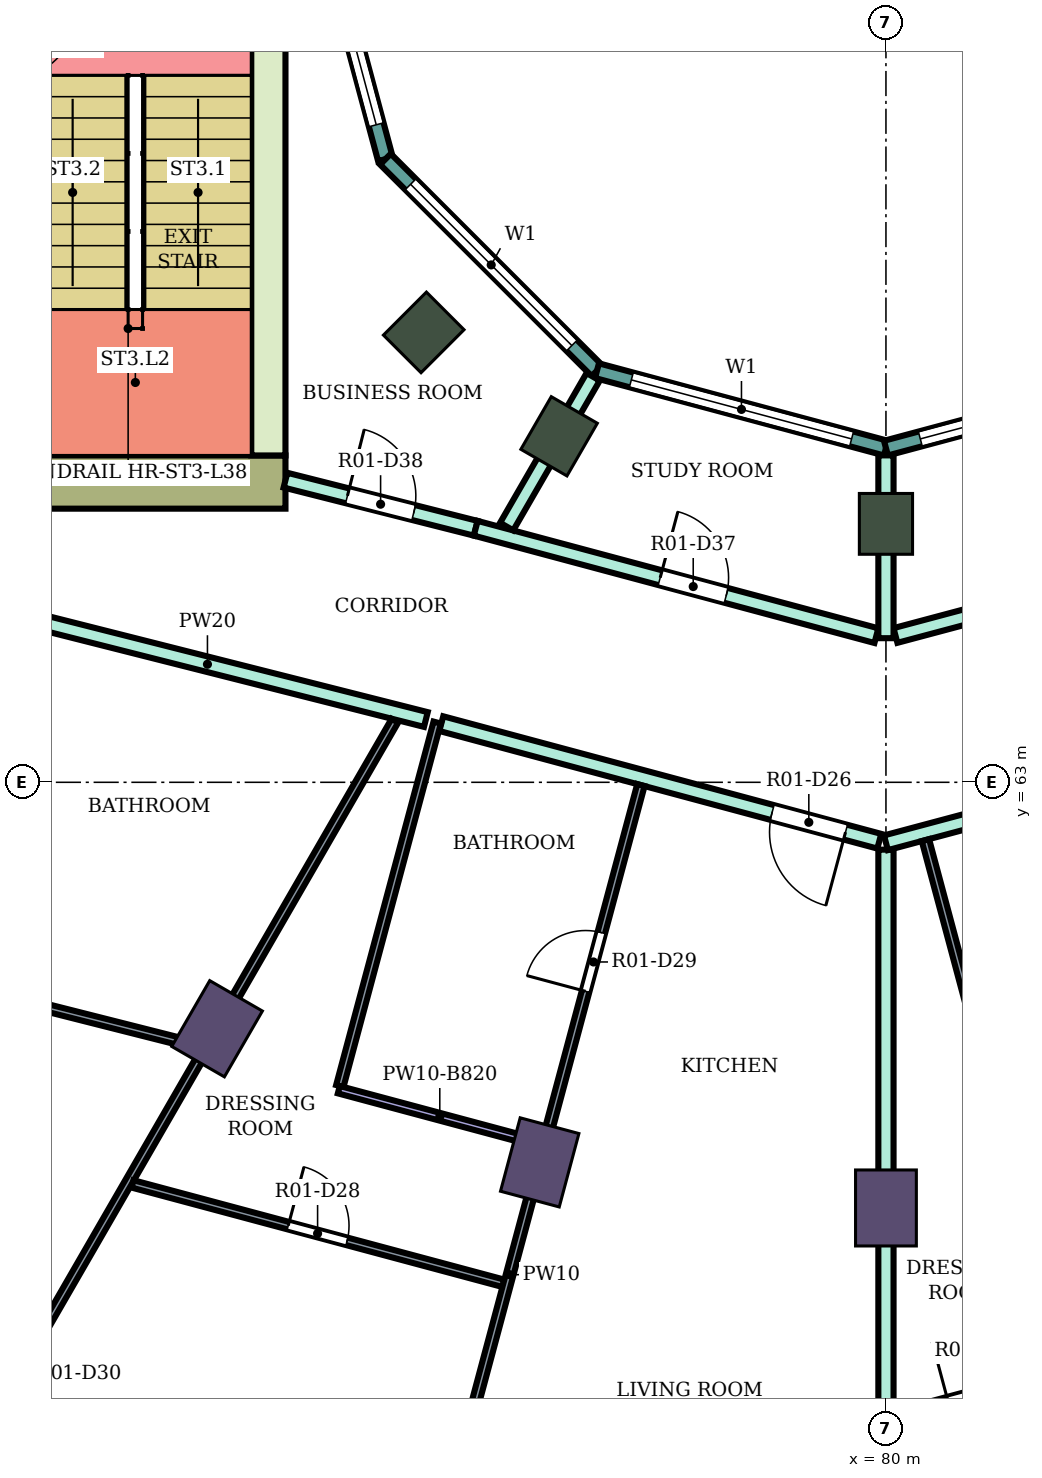
"""IFC4 building model, lengths in metres.
Left out: names, types, materials, properties, quantities, classifications, styles, units other than length and angle.
Written with IfcOpenShell. Run it as: python <this file> out.ifc"""

import sys

from ifc_helpers import new_model, si_unit, direction, frame, frame_2d, origin, origin_2d, place, context, subcontext, project, spatial, rectangle, extrude, element, fill, save


model = new_model("IFC4")
c1 = context("Model", 3, precision=1e-05, world=origin(), true_north=direction((0.0, 1.0)))
c2 = subcontext(c1, "Body", "Model", "MODEL_VIEW")
j1 = project(units=[si_unit("LENGTHUNIT", "METRE"), si_unit("PLANEANGLEUNIT", "RADIAN")], contexts=[c1])
p1 = place(None, origin())
s1 = spatial("IfcSite", under=j1, at=p1, CompositionType="ELEMENT")
p2 = place(p1, origin())
s2 = spatial("IfcBuilding", under=s1, at=p2, CompositionType="ELEMENT")
p3 = place(p2, frame((0.0, 0.0, 165.9)))
s3 = spatial("IfcBuildingStorey", under=s2, at=p3, CompositionType="ELEMENT", Elevation=165.9)
for number, where, z_axis, x_axis in (
    (1, (71.2, 59.758, 0.0), (0.0, 0.0, 1.0), (-0.5, -0.866, 0.0)),
    (2, (75.445, 58.0, 0.0), (0.0, 0.0, 1.0), (-0.259, -0.966, 0.0)),
    (3, (80.0, 57.4, 0.0), (0.0, 0.0, 1.0), (0.0, -1.0, 0.0)),
):
    element("IfcColumn", number, at=place(p3, frame(where, z_axis=z_axis, x_axis=x_axis)), inside=s3, PredefinedType="COLUMN", context=c2, shape_type="SweptSolid", body=[
        extrude(rectangle(XDim=1.0, YDim=0.8, at=origin_2d()), origin(), (0.0, 0.0, 1.0), 4.1),
    ])
for number, where, z_axis, x_axis in (
    (4, (73.919, 68.919, 0.0), (0.0, 0.0, 1.0), (-0.707, -0.707, 0.0)),
    (5, (75.7, 67.552, 0.0), (0.0, 0.0, 1.0), (-0.5, -0.866, 0.0)),
    (6, (80.0, 66.4, 0.0), (0.0, 0.0, 1.0), (0.0, -1.0, 0.0)),
):
    element("IfcColumn", number, at=place(p3, frame(where, z_axis=z_axis, x_axis=x_axis)), inside=s3, PredefinedType="COLUMN", context=c2, shape_type="SweptSolid", body=[
        extrude(rectangle(XDim=0.8, YDim=0.7, at=origin_2d()), origin(), (0.0, 0.0, 1.0), 4.1),
    ])
p4 = place(p3, frame((72.1, 66.95, 0.0), z_axis=(0.0, 0.0, 1.0), x_axis=(-1.0, 0.0, 0.0)))
e7 = element("IfcWall", 7, at=p4, inside=s3, PredefinedType="SHEAR", context=c2, shape_type="SweptSolid", body=[
    extrude(rectangle(XDim=14.8, YDim=0.7, at=frame_2d((7.4, 0.0))), origin(), (0.0, 0.0, 1.0), 3.78),
])
p5 = place(p4, frame((4.2, 0.0, 0.0)))
e8 = element("IfcOpeningElement", 8, at=p5, cuts=e7, PredefinedType="OPENING", context=c2, shape_type="SweptSolid", body=[
    extrude(rectangle(XDim=2.4, YDim=2.4, at=frame_2d((1.2, 1.2))), frame((0.0, 0.36, 0.0), z_axis=(0.0, -1.0, 0.0), x_axis=(1.0, 0.0, 0.0)), (0.0, 0.0, 1.0), 0.72),
])
p6 = place(p3, frame((71.875, 75.0, 0.0), z_axis=(0.0, 0.0, 1.0), x_axis=(0.0, -1.0, 0.0)))
e9 = element("IfcWall", 9, at=p6, inside=s3, PredefinedType="SHEAR", context=c2, shape_type="SweptSolid", body=[
    extrude(rectangle(XDim=7.7, YDim=0.45, at=frame_2d((3.85, 0.0))), origin(), (0.0, 0.0, 1.0), 3.78),
])
p7 = place(p3, frame((72.396, 75.0, 0.0), z_axis=(0.0, 0.0, 1.0), x_axis=(0.258789828301, -0.965933654434, 0.0)))
e10 = element("IfcWall", 10, at=p7, inside=s3, PredefinedType="NOTDEFINED", context=c2, shape_type="SweptSolid", body=[
    extrude(rectangle(XDim=3.936, YDim=0.2, at=frame_2d((1.968, 0.0))), origin(), (0.0, 0.0, 1.0), 4.1),
])
p8 = place(p7, frame((0.468, 0.0, 0.9)))
e11 = element("IfcOpeningElement", 11, at=p8, cuts=e10, PredefinedType="OPENING", context=c2, shape_type="SweptSolid", body=[
    extrude(rectangle(XDim=3.0, YDim=2.3, at=frame_2d((1.5, 1.15))), frame((0.0, 0.11, 0.0), z_axis=(0.0, -1.0, 0.0), x_axis=(1.0, 0.0, 0.0)), (0.0, 0.0, 1.0), 0.22),
])
p9 = place(p3, frame((73.415, 71.198, 0.0), z_axis=(0.0, 0.0, 1.0), x_axis=(0.707106781187, -0.707106781187, 0.0)))
e12 = element("IfcWall", 12, at=p9, inside=s3, PredefinedType="NOTDEFINED", context=c2, shape_type="SweptSolid", body=[
    extrude(rectangle(XDim=3.936, YDim=0.2, at=frame_2d((1.968, 0.0))), origin(), (0.0, 0.0, 1.0), 4.1),
])
p10 = place(p9, frame((0.468, 0.0, 0.9)))
e13 = element("IfcOpeningElement", 13, at=p10, cuts=e12, PredefinedType="OPENING", context=c2, shape_type="SweptSolid", body=[
    extrude(rectangle(XDim=3.0, YDim=2.3, at=frame_2d((1.5, 1.15))), frame((0.0, 0.11, 0.0), z_axis=(0.0, -1.0, 0.0), x_axis=(1.0, 0.0, 0.0)), (0.0, 0.0, 1.0), 0.22),
])
p11 = place(p3, frame((76.198, 68.415, 0.0), z_axis=(0.0, 0.0, 1.0), x_axis=(0.965933654434, -0.258789828301, 0.0)))
e14 = element("IfcWall", 14, at=p11, inside=s3, PredefinedType="NOTDEFINED", context=c2, shape_type="SweptSolid", body=[
    extrude(rectangle(XDim=3.936, YDim=0.2, at=frame_2d((1.968, 0.0))), origin(), (0.0, 0.0, 1.0), 4.1),
])
p12 = place(p11, frame((0.468, 0.0, 0.9)))
e15 = element("IfcOpeningElement", 15, at=p12, cuts=e14, PredefinedType="OPENING", context=c2, shape_type="SweptSolid", body=[
    extrude(rectangle(XDim=3.0, YDim=2.3, at=frame_2d((1.5, 1.15))), frame((0.0, 0.11, 0.0), z_axis=(0.0, -1.0, 0.0), x_axis=(1.0, 0.0, 0.0)), (0.0, 0.0, 1.0), 0.22),
])
p13 = place(p3, frame((80.0, 67.396, 0.0), z_axis=(0.0, 0.0, 1.0), x_axis=(0.965933654434, 0.258789828301, 0.0)))
e16 = element("IfcWall", 16, at=p13, inside=s3, PredefinedType="NOTDEFINED", context=c2, shape_type="SweptSolid", body=[
    extrude(rectangle(XDim=3.936, YDim=0.2, at=frame_2d((1.968, 0.0))), origin(), (0.0, 0.0, 1.0), 4.1),
])
p14 = place(p13, frame((0.468, 0.0, 0.9)))
e17 = element("IfcOpeningElement", 17, at=p14, cuts=e16, PredefinedType="OPENING", context=c2, shape_type="SweptSolid", body=[
    extrude(rectangle(XDim=3.0, YDim=2.3, at=frame_2d((1.5, 1.15))), frame((0.0, 0.11, 0.0), z_axis=(0.0, -1.0, 0.0), x_axis=(1.0, 0.0, 0.0)), (0.0, 0.0, 1.0), 0.22),
])
p15 = place(p3, frame((68.2, 65.28, 0.0), z_axis=(0.0, 0.0, 1.0), x_axis=(0.969450596516, -0.245286650503, 0.0)))
e18 = element("IfcWall", 18, at=p15, inside=s3, PredefinedType="PARTITIONING", context=c2, shape_type="SweptSolid", body=[
    extrude(rectangle(XDim=5.928, YDim=0.2, at=frame_2d((2.964, 0.0))), origin(), (0.0, 0.0, 1.0), 3.65),
])
p16 = place(p3, frame((72.1, 66.975, 0.0), z_axis=(0.0, 0.0, 1.0), x_axis=(0.969471314457, -0.245204752086, 0.0)))
e19 = element("IfcWall", 19, at=p16, inside=s3, PredefinedType="PARTITIONING", context=c2, shape_type="SweptSolid", body=[
    extrude(rectangle(XDim=2.582, YDim=0.2, at=frame_2d((1.291, 0.0))), origin(), (0.0, 0.0, 1.0), 3.65),
])
p17 = place(p16, frame((0.841, 0.0, 0.0)))
e20 = element("IfcOpeningElement", 20, at=p17, cuts=e19, PredefinedType="OPENING", context=c2, shape_type="SweptSolid", body=[
    extrude(rectangle(XDim=0.9, YDim=2.1, at=frame_2d((0.45, 1.05))), frame((0.0, 0.11, 0.0), z_axis=(0.0, -1.0, 0.0), x_axis=(1.0, 0.0, 0.0)), (0.0, 0.0, 1.0), 0.22),
])
p18 = place(p3, frame((74.15, 63.772, 0.0), z_axis=(0.0, 0.0, 1.0), x_axis=(0.965807109237, -0.259261697417, 0.0)))
e21 = element("IfcWall", 21, at=p18, inside=s3, PredefinedType="PARTITIONING", context=c2, shape_type="SweptSolid", body=[
    extrude(rectangle(XDim=5.967, YDim=0.2, at=frame_2d((2.983, 0.0))), origin(), (0.0, 0.0, 1.0), 3.65),
])
p19 = place(p18, frame((4.507, 0.0, 0.0)))
e22 = element("IfcOpeningElement", 22, at=p19, cuts=e21, PredefinedType="OPENING", context=c2, shape_type="SweptSolid", body=[
    extrude(rectangle(XDim=1.0, YDim=2.1, at=frame_2d((0.5, 1.05))), frame((0.0, 0.11, 0.0), z_axis=(0.0, -1.0, 0.0), x_axis=(1.0, 0.0, 0.0)), (0.0, 0.0, 1.0), 0.22),
])
p20 = place(p3, frame((74.603, 66.342, 0.0), z_axis=(0.0, 0.0, 1.0), x_axis=(0.965920893652, -0.258837453254, 0.0)))
e23 = element("IfcWall", 23, at=p20, inside=s3, PredefinedType="PARTITIONING", context=c2, shape_type="SweptSolid", body=[
    extrude(rectangle(XDim=5.458, YDim=0.2, at=frame_2d((2.729, 0.0))), origin(), (0.0, 0.0, 1.0), 3.65),
])
p21 = place(p20, frame((2.512, 0.0, 0.0)))
e24 = element("IfcOpeningElement", 24, at=p21, cuts=e23, PredefinedType="OPENING", context=c2, shape_type="SweptSolid", body=[
    extrude(rectangle(XDim=0.9, YDim=2.1, at=frame_2d((0.45, 1.05))), frame((0.0, 0.11, 0.0), z_axis=(0.0, -1.0, 0.0), x_axis=(1.0, 0.0, 0.0)), (0.0, 0.0, 1.0), 0.22),
])
p22 = place(p3, frame((75.01, 66.364, 0.0), z_axis=(0.0, 0.0, 1.0), x_axis=(0.50017749597, 0.865922902183, 0.0)))
e25 = element("IfcWall", 25, at=p22, inside=s3, PredefinedType="PARTITIONING", context=c2, shape_type="SweptSolid", body=[
    extrude(rectangle(XDim=2.276, YDim=0.2, at=frame_2d((1.138, 0.0))), origin(), (0.0, 0.0, 1.0), 3.65),
])
p23 = place(p3, frame((80.125, 64.932, 0.0), z_axis=(0.0, 0.0, 1.0), x_axis=(0.966236955806, 0.257655089674, 0.0)))
e26 = element("IfcWall", 26, at=p23, inside=s3, PredefinedType="PARTITIONING", context=c2, shape_type="SweptSolid", body=[
    extrude(rectangle(XDim=8.039, YDim=0.2, at=frame_2d((4.02, 0.0))), origin(), (0.0, 0.0, 1.0), 3.65),
])
p24 = place(p23, frame((6.298, 0.0, 0.0)))
e27 = element("IfcOpeningElement", 27, at=p24, cuts=e26, PredefinedType="OPENING", context=c2, shape_type="SweptSolid", body=[
    extrude(rectangle(XDim=0.9, YDim=2.1, at=frame_2d((0.45, 1.05))), frame((0.0, 0.11, 0.0), z_axis=(0.0, -1.0, 0.0), x_axis=(1.0, 0.0, 0.0)), (0.0, 0.0, 1.0), 0.22),
])
p25 = place(p23, frame((2.045, 0.0, 0.0)))
e28 = element("IfcOpeningElement", 28, at=p25, cuts=e26, PredefinedType="OPENING", context=c2, shape_type="SweptSolid", body=[
    extrude(rectangle(XDim=0.9, YDim=2.1, at=frame_2d((0.45, 1.05))), frame((0.0, 0.11, 0.0), z_axis=(0.0, -1.0, 0.0), x_axis=(1.0, 0.0, 0.0)), (0.0, 0.0, 1.0), 0.22),
])
p26 = place(p3, frame((80.0, 51.8, 0.0), z_axis=(0.0, 0.0, 1.0), x_axis=(0.0, 1.0, 0.0)))
e29 = element("IfcWall", 29, at=p26, inside=s3, PredefinedType="PARTITIONING", context=c2, shape_type="SweptSolid", body=[
    extrude(rectangle(XDim=10.314, YDim=0.2, at=frame_2d((5.157, 0.0))), origin(), (0.0, 0.0, 1.0), 3.65),
])
p27 = place(p3, frame((80.0, 62.205, 0.0), z_axis=(0.0, 0.0, 1.0), x_axis=(0.966104192593, 0.258152453124, 0.0)))
e30 = element("IfcWall", 30, at=p27, inside=s3, PredefinedType="PARTITIONING", context=c2, shape_type="SweptSolid", body=[
    extrude(rectangle(XDim=6.266, YDim=0.2, at=frame_2d((3.133, 0.0))), origin(), (0.0, 0.0, 1.0), 3.65),
])
p28 = place(p27, frame((3.842, 0.0, 0.0)))
e31 = element("IfcOpeningElement", 31, at=p28, cuts=e30, PredefinedType="OPENING", context=c2, shape_type="SweptSolid", body=[
    extrude(rectangle(XDim=1.0, YDim=2.1, at=frame_2d((0.5, 1.05))), frame((0.0, 0.11, 0.0), z_axis=(0.0, -1.0, 0.0), x_axis=(1.0, 0.0, 0.0)), (0.0, 0.0, 1.0), 0.22),
])
p29 = place(p3, frame((80.0, 64.896, 0.0), z_axis=(0.0, 0.0, 1.0), x_axis=(0.0, 1.0, 0.0)))
e32 = element("IfcWall", 32, at=p29, inside=s3, PredefinedType="PARTITIONING", context=c2, shape_type="SweptSolid", body=[
    extrude(rectangle(XDim=2.405, YDim=0.2, at=frame_2d((1.203, 0.0))), origin(), (0.0, 0.0, 1.0), 3.65),
])
p30 = place(p3, frame((65.904, 60.806, 0.0), z_axis=(0.0, 0.0, 1.0), x_axis=(0.969477107154, -0.245181848237, 0.0)))
e33 = element("IfcWall", 33, at=p30, inside=s3, PredefinedType="PARTITIONING", context=c2, shape_type="SweptSolid", body=[
    extrude(rectangle(XDim=5.252, YDim=0.1, at=frame_2d((2.626, 0.0))), origin(), (0.0, 0.0, 1.0), 3.65),
])
p31 = place(p30, frame((2.216, 0.0, 0.0)))
e34 = element("IfcOpeningElement", 34, at=p31, cuts=e33, PredefinedType="OPENING", context=c2, shape_type="SweptSolid", body=[
    extrude(rectangle(XDim=0.8, YDim=2.1, at=frame_2d((0.4, 1.05))), frame((0.0, 0.06, 0.0), z_axis=(0.0, -1.0, 0.0), x_axis=(1.0, 0.0, 0.0)), (0.0, 0.0, 1.0), 0.12),
])
p32 = place(p3, frame((67.101, 52.659, 0.0), z_axis=(0.0, 0.0, 1.0), x_axis=(0.499985055897, 0.866034031594, 0.0)))
e35 = element("IfcWall", 35, at=p32, inside=s3, PredefinedType="PARTITIONING", context=c2, shape_type="SweptSolid", body=[
    extrude(rectangle(XDim=12.876, YDim=0.1, at=frame_2d((6.438, 0.0))), origin(), (0.0, 0.0, 1.0), 3.65),
])
p33 = place(p32, frame((2.504, 0.0, 0.0)))
e36 = element("IfcOpeningElement", 36, at=p33, cuts=e35, PredefinedType="OPENING", context=c2, shape_type="SweptSolid", body=[
    extrude(rectangle(XDim=0.9, YDim=2.1, at=frame_2d((0.45, 1.05))), frame((0.0, 0.06, 0.0), z_axis=(0.0, -1.0, 0.0), x_axis=(1.0, 0.0, 0.0)), (0.0, 0.0, 1.0), 0.12),
])
p34 = place(p3, frame((70.088, 57.717, 0.0), z_axis=(0.0, 0.0, 1.0), x_axis=(0.965906836082, -0.258889907124, 0.0)))
e37 = element("IfcWall", 37, at=p34, inside=s3, PredefinedType="PARTITIONING", context=c2, shape_type="SweptSolid", body=[
    extrude(rectangle(XDim=5.051, YDim=0.1, at=frame_2d((2.525, 0.0))), origin(), (0.0, 0.0, 1.0), 3.65),
])
p35 = place(p34, frame((2.121, 0.0, 0.0)))
e38 = element("IfcOpeningElement", 38, at=p35, cuts=e37, PredefinedType="OPENING", context=c2, shape_type="SweptSolid", body=[
    extrude(rectangle(XDim=0.8, YDim=2.1, at=frame_2d((0.4, 1.05))), frame((0.0, 0.06, 0.0), z_axis=(0.0, -1.0, 0.0), x_axis=(1.0, 0.0, 0.0)), (0.0, 0.0, 1.0), 0.12),
])
p36 = place(p3, frame((72.815, 59.004, 0.0), z_axis=(0.0, 0.0, 1.0), x_axis=(0.25878292514, 0.96593550388, 0.0)))
e39 = element("IfcWall", 39, at=p36, inside=s3, PredefinedType="PARTITIONING", context=c2, shape_type="SweptSolid", body=[
    extrude(rectangle(XDim=4.95, YDim=0.1, at=frame_2d((2.475, 0.0))), origin(), (0.0, 0.0, 1.0), 3.65),
])
p37 = place(p3, frame((72.802, 58.956, 0.0), z_axis=(0.0, 0.0, 1.0), x_axis=(0.965887802097, -0.258960911647, 0.0)))
e40 = element("IfcWall", 40, at=p37, inside=s3, PredefinedType="PARTITIONING", context=c2, shape_type="SweptSolid", body=[
    extrude(rectangle(XDim=2.75, YDim=0.1, at=frame_2d((1.375, 0.0))), origin(), (0.0, 0.0, 1.0), 3.28),
])
p38 = place(p3, frame((73.322, 50.081, 0.0), z_axis=(0.0, 0.0, 1.0), x_axis=(0.258982801816, 0.965881932931, 0.0)))
e41 = element("IfcWall", 41, at=p38, inside=s3, PredefinedType="PARTITIONING", context=c2, shape_type="SweptSolid", body=[
    extrude(rectangle(XDim=13.338, YDim=0.1, at=frame_2d((6.669, 0.0))), origin(), (0.0, 0.0, 1.0), 3.65),
])
p39 = place(p38, frame((2.854, 0.0, 0.0)))
e42 = element("IfcOpeningElement", 42, at=p39, cuts=e41, PredefinedType="OPENING", context=c2, shape_type="SweptSolid", body=[
    extrude(rectangle(XDim=0.9, YDim=2.1, at=frame_2d((0.45, 1.05))), frame((0.0, 0.06, 0.0), z_axis=(0.0, -1.0, 0.0), x_axis=(1.0, 0.0, 0.0)), (0.0, 0.0, 1.0), 0.12),
])
p40 = place(p38, frame((10.528, 0.0, 0.0)))
e43 = element("IfcOpeningElement", 43, at=p40, cuts=e41, PredefinedType="OPENING", context=c2, shape_type="SweptSolid", body=[
    extrude(rectangle(XDim=0.8, YDim=2.1, at=frame_2d((0.4, 1.05))), frame((0.0, 0.06, 0.0), z_axis=(0.0, -1.0, 0.0), x_axis=(1.0, 0.0, 0.0)), (0.0, 0.0, 1.0), 0.12),
])
p41 = place(p3, frame((80.106, 54.676, 0.0), z_axis=(0.0, 0.0, 1.0), x_axis=(0.965976901679, 0.258628353863, 0.0)))
e44 = element("IfcWall", 44, at=p41, inside=s3, PredefinedType="PARTITIONING", context=c2, shape_type="SweptSolid", body=[
    extrude(rectangle(XDim=5.097, YDim=0.1, at=frame_2d((2.549, 0.0))), origin(), (0.0, 0.0, 1.0), 3.65),
])
p42 = place(p41, frame((0.733, 0.0, 0.0)))
e45 = element("IfcOpeningElement", 45, at=p42, cuts=e44, PredefinedType="OPENING", context=c2, shape_type="SweptSolid", body=[
    extrude(rectangle(XDim=0.8, YDim=2.1, at=frame_2d((0.4, 1.05))), frame((0.0, 0.06, 0.0), z_axis=(0.0, -1.0, 0.0), x_axis=(1.0, 0.0, 0.0)), (0.0, 0.0, 1.0), 0.12),
])
p43 = place(p3, frame((80.519, 62.239, 0.0), z_axis=(0.0, 0.0, 1.0), x_axis=(0.25878046533, -0.965936162882, 0.0)))
e46 = element("IfcWall", 46, at=p43, inside=s3, PredefinedType="PARTITIONING", context=c2, shape_type="SweptSolid", body=[
    extrude(rectangle(XDim=7.149, YDim=0.1, at=frame_2d((3.575, 0.0))), origin(), (0.0, 0.0, 1.0), 3.65),
])
p44 = place(p8, origin())
e47 = element("IfcWindow", 47, at=p44, inside=s3, PartitioningType="SINGLE_PANEL", PredefinedType="WINDOW", context=c2, shape_type="SweptSolid", body=[
    extrude(rectangle(XDim=3.0, YDim=2.3, at=frame_2d((1.5, 1.15))), frame((0.0, 0.03, 0.0), z_axis=(0.0, -1.0, 0.0), x_axis=(1.0, 0.0, 0.0)), (0.0, 0.0, 1.0), 0.06),
])
fill(e11, e47)
p45 = place(p10, origin())
e48 = element("IfcWindow", 48, at=p45, inside=s3, PartitioningType="SINGLE_PANEL", PredefinedType="WINDOW", context=c2, shape_type="SweptSolid", body=[
    extrude(rectangle(XDim=3.0, YDim=2.3, at=frame_2d((1.5, 1.15))), frame((0.0, 0.03, 0.0), z_axis=(0.0, -1.0, 0.0), x_axis=(1.0, 0.0, 0.0)), (0.0, 0.0, 1.0), 0.06),
])
fill(e13, e48)
p46 = place(p12, origin())
e49 = element("IfcWindow", 49, at=p46, inside=s3, PartitioningType="SINGLE_PANEL", PredefinedType="WINDOW", context=c2, shape_type="SweptSolid", body=[
    extrude(rectangle(XDim=3.0, YDim=2.3, at=frame_2d((1.5, 1.15))), frame((0.0, 0.03, 0.0), z_axis=(0.0, -1.0, 0.0), x_axis=(1.0, 0.0, 0.0)), (0.0, 0.0, 1.0), 0.06),
])
fill(e15, e49)
p47 = place(p14, origin())
e50 = element("IfcWindow", 50, at=p47, inside=s3, PartitioningType="SINGLE_PANEL", PredefinedType="WINDOW", context=c2, shape_type="SweptSolid", body=[
    extrude(rectangle(XDim=3.0, YDim=2.3, at=frame_2d((1.5, 1.15))), frame((0.0, 0.03, 0.0), z_axis=(0.0, -1.0, 0.0), x_axis=(1.0, 0.0, 0.0)), (0.0, 0.0, 1.0), 0.06),
])
fill(e17, e50)
p48 = place(p42, origin())
e51 = element("IfcDoor", 51, at=p48, inside=s3, OperationType="SINGLE_SWING_LEFT", PredefinedType="DOOR", context=c2, shape_type="SweptSolid", body=[
    extrude(rectangle(XDim=0.8, YDim=2.1, at=frame_2d((0.4, 1.05))), frame((0.0, 0.025, 0.0), z_axis=(0.0, -1.0, 0.0), x_axis=(1.0, 0.0, 0.0)), (0.0, 0.0, 1.0), 0.05),
])
fill(e45, e51)
p49 = place(p19, frame((1.0, 0.0, 0.0), z_axis=(0.0, 0.0, 1.0), x_axis=(-1.0, 0.0, 0.0)))
e52 = element("IfcDoor", 52, at=p49, inside=s3, OperationType="SINGLE_SWING_LEFT", PredefinedType="DOOR", context=c2, shape_type="SweptSolid", body=[
    extrude(rectangle(XDim=1.0, YDim=2.1, at=frame_2d((0.5, 1.05))), frame((0.0, 0.025, 0.0), z_axis=(0.0, -1.0, 0.0), x_axis=(1.0, 0.0, 0.0)), (0.0, 0.0, 1.0), 0.05),
])
fill(e22, e52)
p50 = place(p35, origin())
e53 = element("IfcDoor", 53, at=p50, inside=s3, OperationType="SINGLE_SWING_LEFT", PredefinedType="DOOR", context=c2, shape_type="SweptSolid", body=[
    extrude(rectangle(XDim=0.8, YDim=2.1, at=frame_2d((0.4, 1.05))), frame((0.0, 0.025, 0.0), z_axis=(0.0, -1.0, 0.0), x_axis=(1.0, 0.0, 0.0)), (0.0, 0.0, 1.0), 0.05),
])
fill(e38, e53)
p51 = place(p40, origin())
e54 = element("IfcDoor", 54, at=p51, inside=s3, OperationType="SINGLE_SWING_LEFT", PredefinedType="DOOR", context=c2, shape_type="SweptSolid", body=[
    extrude(rectangle(XDim=0.8, YDim=2.1, at=frame_2d((0.4, 1.05))), frame((0.0, 0.025, 0.0), z_axis=(0.0, -1.0, 0.0), x_axis=(1.0, 0.0, 0.0)), (0.0, 0.0, 1.0), 0.05),
])
fill(e43, e54)
p52 = place(p21, origin())
e55 = element("IfcDoor", 55, at=p52, inside=s3, OperationType="SINGLE_SWING_LEFT", PredefinedType="DOOR", context=c2, shape_type="SweptSolid", body=[
    extrude(rectangle(XDim=0.9, YDim=2.1, at=frame_2d((0.45, 1.05))), frame((0.0, 0.025, 0.0), z_axis=(0.0, -1.0, 0.0), x_axis=(1.0, 0.0, 0.0)), (0.0, 0.0, 1.0), 0.05),
])
fill(e24, e55)
p53 = place(p17, origin())
e56 = element("IfcDoor", 56, at=p53, inside=s3, OperationType="SINGLE_SWING_LEFT", PredefinedType="DOOR", context=c2, shape_type="SweptSolid", body=[
    extrude(rectangle(XDim=0.9, YDim=2.1, at=frame_2d((0.45, 1.05))), frame((0.0, 0.025, 0.0), z_axis=(0.0, -1.0, 0.0), x_axis=(1.0, 0.0, 0.0)), (0.0, 0.0, 1.0), 0.05),
])
fill(e20, e56)
save(model, sys.argv[1])
